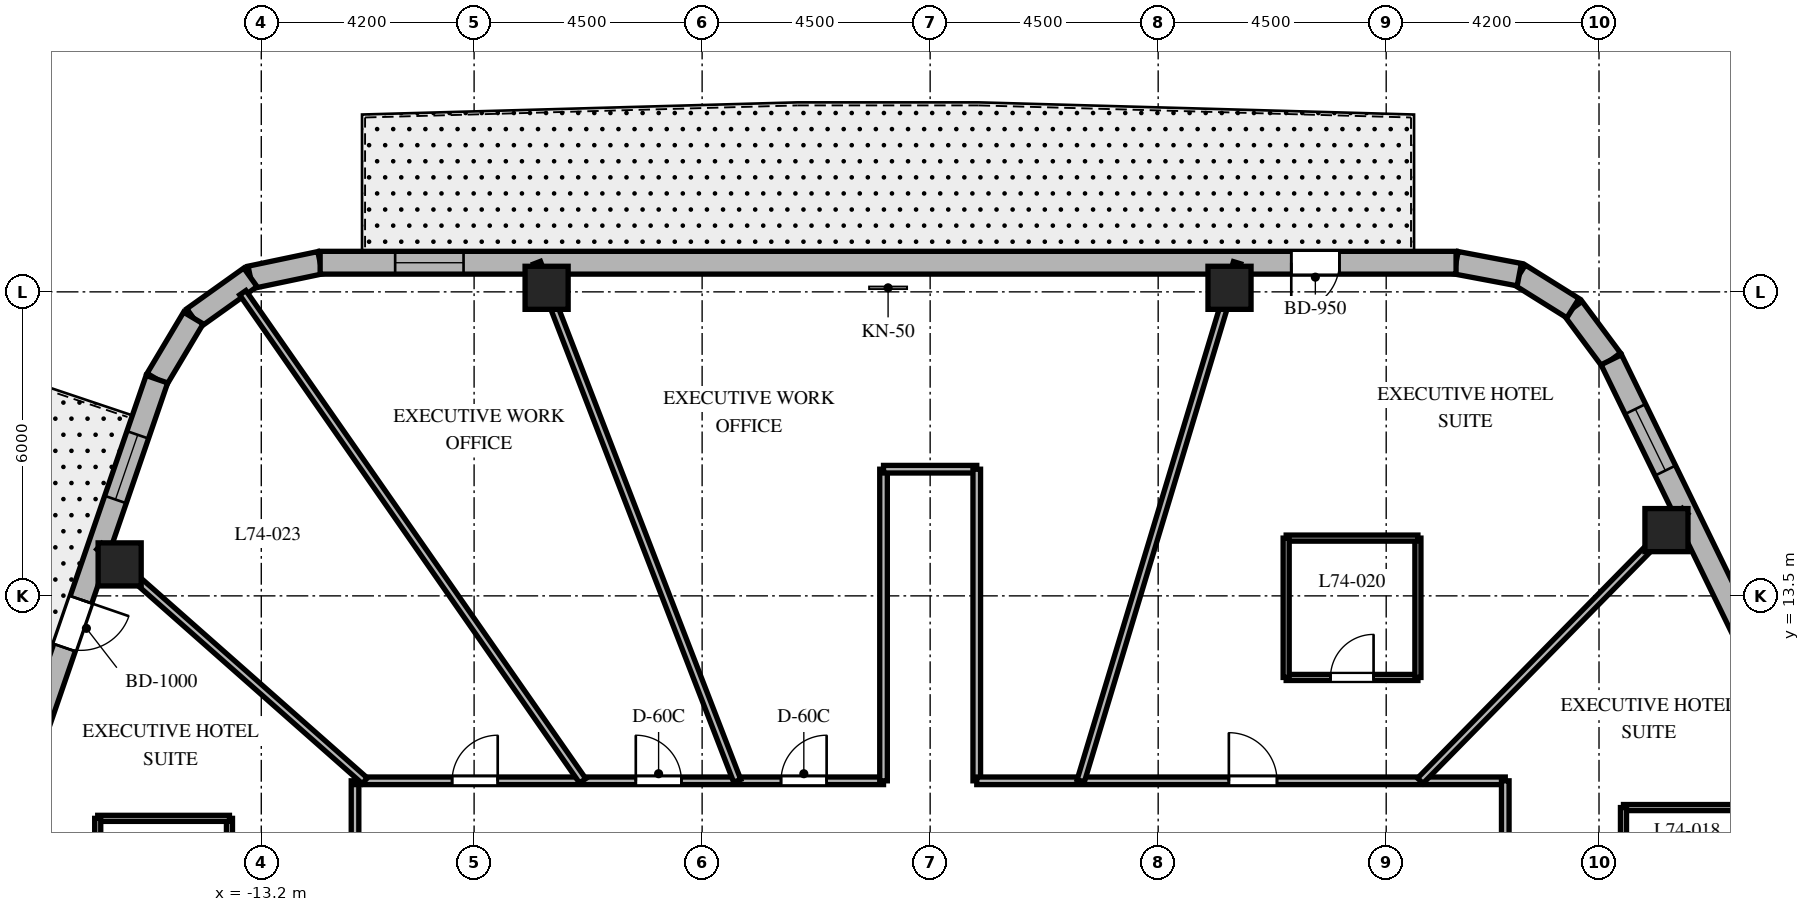
"""IFC4 building model, lengths in metres.
Left out: names, types, materials, properties, quantities, classifications, styles, units other than length and angle.
Written with IfcOpenShell. Run it as: python <this file> out.ifc"""

import sys

from ifc_helpers import new_model, si_unit, direction, frame, frame_2d, origin, origin_2d, place, context, subcontext, project, spatial, rectangle, extrude, element, fill, save


model = new_model("IFC4")
c1 = context("Model", 3, precision=1e-05, world=origin(), true_north=direction((0.0, 1.0)))
c2 = subcontext(c1, "Body", "Model", "MODEL_VIEW")
j1 = project(units=[si_unit("LENGTHUNIT", "METRE"), si_unit("PLANEANGLEUNIT", "RADIAN")], contexts=[c1])
p1 = place(None, origin())
s1 = spatial("IfcSite", under=j1, at=p1, CompositionType="ELEMENT")
p2 = place(p1, origin())
s2 = spatial("IfcBuilding", under=s1, at=p2, CompositionType="ELEMENT")
p3 = place(p2, frame((0.0, 0.0, 297.6)))
s3 = spatial("IfcBuildingStorey", under=s2, at=p3, CompositionType="ELEMENT", Elevation=297.6)
for number, where, z_axis, x_axis in (
    (1, (14.531, 14.798, 0.0), (0.0, 0.0, 1.0), (1.0, 0.0, 0.0)),
    (2, (5.908, 19.58, 0.0), (0.0, 0.0, 1.0), (1.0, 0.0, 0.0)),
    (3, (-7.569, 19.58, 0.0), (0.0, 0.0, 1.0), (1.0, 0.0, 0.0)),
    (4, (-15.995, 14.121, 0.0), (0.0, 0.0, 1.0), (1.0, 0.0, 0.0)),
):
    element("IfcColumn", number, at=place(p3, frame(where, z_axis=z_axis, x_axis=x_axis)), inside=s3, PredefinedType="COLUMN", context=c2, shape_type="SweptSolid", body=[
        extrude(rectangle(XDim=0.85, YDim=0.85, at=origin_2d()), origin(), (0.0, 0.0, 1.0), 3.9),
    ])
p4 = place(p3, frame((13.443, 18.16, 0.0), z_axis=(0.0, 0.0, 1.0), x_axis=(-0.597042425808, 0.802209661987, 0.0)))
e5 = element("IfcWall", 5, at=p4, inside=s3, PredefinedType="SOLIDWALL", context=c2, shape_type="SweptSolid", body=[
    extrude(rectangle(XDim=1.27, YDim=0.45, at=frame_2d((0.635, 0.0))), origin(), (0.0, 0.0, 1.0), 3.6),
])
p5 = place(p3, frame((12.685, 19.178, 0.0), z_axis=(0.0, 0.0, 1.0), x_axis=(-0.848031272749, 0.529946186362, 0.0)))
e6 = element("IfcWall", 6, at=p5, inside=s3, PredefinedType="SOLIDWALL", context=c2, shape_type="SweptSolid", body=[
    extrude(rectangle(XDim=1.248, YDim=0.45, at=frame_2d((0.624, 0.0))), origin(), (0.0, 0.0, 1.0), 3.6),
])
p6 = place(p3, frame((11.626, 19.84, 0.0), z_axis=(0.0, 0.0, 1.0), x_axis=(-0.982701956681, 0.185194126083, 0.0)))
e7 = element("IfcWall", 7, at=p6, inside=s3, PredefinedType="SOLIDWALL", context=c2, shape_type="SweptSolid", body=[
    extrude(rectangle(XDim=1.27, YDim=0.45, at=frame_2d((0.635, 0.0))), origin(), (0.0, 0.0, 1.0), 3.6),
])
p7 = place(p3, frame((-12.038, 20.075, 0.0), z_axis=(0.0, 0.0, 1.0), x_axis=(-0.978750122553, -0.205056571711, 0.0)))
e8 = element("IfcWall", 8, at=p7, inside=s3, PredefinedType="SOLIDWALL", context=c2, shape_type="SweptSolid", body=[
    extrude(rectangle(XDim=1.406, YDim=0.45, at=frame_2d((0.703, 0.0))), origin(), (0.0, 0.0, 1.0), 3.6),
])
p8 = place(p3, frame((-13.415, 19.787, 0.0), z_axis=(0.0, 0.0, 1.0), x_axis=(-0.814055493997, -0.580787097561, 0.0)))
e9 = element("IfcWall", 9, at=p8, inside=s3, PredefinedType="SOLIDWALL", context=c2, shape_type="SweptSolid", body=[
    extrude(rectangle(XDim=1.383, YDim=0.45, at=frame_2d((0.691, 0.0))), origin(), (0.0, 0.0, 1.0), 3.6),
])
p9 = place(p3, frame((-14.54, 18.984, 0.0), z_axis=(0.0, 0.0, 1.0), x_axis=(-0.512374906623, -0.858761873317, 0.0)))
e10 = element("IfcWall", 10, at=p9, inside=s3, PredefinedType="SOLIDWALL", context=c2, shape_type="SweptSolid", body=[
    extrude(rectangle(XDim=1.406, YDim=0.45, at=frame_2d((0.703, 0.0))), origin(), (0.0, 0.0, 1.0), 3.6),
])
p10 = place(p3, frame((21.138, 2.371, 0.0), z_axis=(0.0, 0.0, 1.0), x_axis=(-0.438128124058, 0.89891253574, 0.0)))
e11 = element("IfcWall", 11, at=p10, inside=s3, PredefinedType="SOLIDWALL", context=c2, shape_type="SweptSolid", body=[
    extrude(rectangle(XDim=17.565, YDim=0.45, at=frame_2d((8.782, 0.0))), origin(), (0.0, 0.0, 1.0), 3.6),
])
p11 = place(p10, frame((1.133, 0.0, 0.8)))
e12 = element("IfcOpeningElement", 12, at=p11, cuts=e11, PredefinedType="OPENING", context=c2, shape_type="SweptSolid", body=[
    extrude(rectangle(XDim=1.35, YDim=1.75, at=frame_2d((0.675, 0.875))), frame((0.0, 0.235, 0.0), z_axis=(0.0, -1.0, 0.0), x_axis=(1.0, 0.0, 0.0)), (0.0, 0.0, 1.0), 0.47),
])
p12 = place(p10, frame((8.158, 0.0, 0.8)))
e13 = element("IfcOpeningElement", 13, at=p12, cuts=e11, PredefinedType="OPENING", context=c2, shape_type="SweptSolid", body=[
    extrude(rectangle(XDim=1.35, YDim=1.75, at=frame_2d((0.675, 0.875))), frame((0.0, 0.235, 0.0), z_axis=(0.0, -1.0, 0.0), x_axis=(1.0, 0.0, 0.0)), (0.0, 0.0, 1.0), 0.47),
])
p13 = place(p10, frame((15.132, 0.0, 0.8)))
e14 = element("IfcOpeningElement", 14, at=p13, cuts=e11, PredefinedType="OPENING", context=c2, shape_type="SweptSolid", body=[
    extrude(rectangle(XDim=1.35, YDim=1.75, at=frame_2d((0.675, 0.875))), frame((0.0, 0.235, 0.0), z_axis=(0.0, -1.0, 0.0), x_axis=(1.0, 0.0, 0.0)), (0.0, 0.0, 1.0), 0.47),
])
p14 = place(p3, frame((10.379, 20.075, 0.0), z_axis=(0.0, 0.0, 1.0), x_axis=(-1.0, 0.0, 0.0)))
e15 = element("IfcWall", 15, at=p14, inside=s3, PredefinedType="SOLIDWALL", context=c2, shape_type="SweptSolid", body=[
    extrude(rectangle(XDim=22.417, YDim=0.45, at=frame_2d((11.208, 0.0))), origin(), (0.0, 0.0, 1.0), 3.6),
])
p15 = place(p14, frame((2.302, 0.0, 0.0)))
e16 = element("IfcOpeningElement", 16, at=p15, cuts=e15, PredefinedType="OPENING", context=c2, shape_type="SweptSolid", body=[
    extrude(rectangle(XDim=0.95, YDim=2.15, at=frame_2d((0.475, 1.075))), frame((0.0, 0.235, 0.0), z_axis=(0.0, -1.0, 0.0), x_axis=(1.0, 0.0, 0.0)), (0.0, 0.0, 1.0), 0.47),
])
p16 = place(p14, frame((19.587, 0.0, 0.8)))
e17 = element("IfcOpeningElement", 17, at=p16, cuts=e15, PredefinedType="OPENING", context=c2, shape_type="SweptSolid", body=[
    extrude(rectangle(XDim=1.35, YDim=1.75, at=frame_2d((0.675, 0.875))), frame((0.0, 0.235, 0.0), z_axis=(0.0, -1.0, 0.0), x_axis=(1.0, 0.0, 0.0)), (0.0, 0.0, 1.0), 0.47),
])
p17 = place(p3, frame((-15.26, 17.776, 0.0), z_axis=(0.0, 0.0, 1.0), x_axis=(-0.325407437101, -0.945573899745, 0.0)))
e18 = element("IfcWall", 18, at=p17, inside=s3, PredefinedType="SOLIDWALL", context=c2, shape_type="SweptSolid", body=[
    extrude(rectangle(XDim=18.552, YDim=0.45, at=frame_2d((9.276, 0.0))), origin(), (0.0, 0.0, 1.0), 3.6),
])
p18 = place(p17, frame((4.602, 0.0, 0.0)))
e19 = element("IfcOpeningElement", 19, at=p18, cuts=e18, PredefinedType="OPENING", context=c2, shape_type="SweptSolid", body=[
    extrude(rectangle(XDim=1.0, YDim=2.15, at=frame_2d((0.5, 1.075))), frame((0.0, 0.235, 0.0), z_axis=(0.0, -1.0, 0.0), x_axis=(1.0, 0.0, 0.0)), (0.0, 0.0, 1.0), 0.47),
])
p19 = place(p17, frame((1.161, 0.0, 0.8)))
e20 = element("IfcOpeningElement", 20, at=p19, cuts=e18, PredefinedType="OPENING", context=c2, shape_type="SweptSolid", body=[
    extrude(rectangle(XDim=1.35, YDim=1.75, at=frame_2d((0.675, 0.875))), frame((0.0, 0.235, 0.0), z_axis=(0.0, -1.0, 0.0), x_axis=(1.0, 0.0, 0.0)), (0.0, 0.0, 1.0), 0.47),
])
p20 = place(p17, frame((8.548, 0.0, 0.8)))
e21 = element("IfcOpeningElement", 21, at=p20, cuts=e18, PredefinedType="OPENING", context=c2, shape_type="SweptSolid", body=[
    extrude(rectangle(XDim=1.35, YDim=1.75, at=frame_2d((0.675, 0.875))), frame((0.0, 0.235, 0.0), z_axis=(0.0, -1.0, 0.0), x_axis=(1.0, 0.0, 0.0)), (0.0, 0.0, 1.0), 0.47),
])
p21 = place(p17, frame((15.987, 0.0, 0.8)))
e22 = element("IfcOpeningElement", 22, at=p21, cuts=e18, PredefinedType="OPENING", context=c2, shape_type="SweptSolid", body=[
    extrude(rectangle(XDim=1.35, YDim=1.75, at=frame_2d((0.675, 0.875))), frame((0.0, 0.235, 0.0), z_axis=(0.0, -1.0, 0.0), x_axis=(1.0, 0.0, 0.0)), (0.0, 0.0, 1.0), 0.47),
])
p22 = place(p3, frame((-11.35, 4.4, 0.0), z_axis=(0.0, 0.0, 1.0), x_axis=(0.0, 1.0, 0.0)))
e23 = element("IfcWall", 23, at=p22, inside=s3, PredefinedType="PARTITIONING", context=c2, shape_type="SweptSolid", body=[
    extrude(rectangle(XDim=5.45, YDim=0.15, at=frame_2d((2.725, 0.0))), origin(), (0.0, 0.0, 1.0), 2.816),
])
p23 = place(p3, frame((-11.35, 9.85, 0.0), z_axis=(0.0, 0.0, 1.0), x_axis=(1.0, 0.0, 0.0)))
e24 = element("IfcWall", 24, at=p23, inside=s3, PredefinedType="PARTITIONING", context=c2, shape_type="SweptSolid", body=[
    extrude(rectangle(XDim=10.43, YDim=0.15, at=frame_2d((5.215, 0.0))), origin(), (0.0, 0.0, 1.0), 2.894),
])
p24 = place(p23, frame((8.407, 0.0, 0.0)))
e25 = element("IfcOpeningElement", 25, at=p24, cuts=e24, PredefinedType="OPENING", context=c2, shape_type="SweptSolid", body=[
    extrude(rectangle(XDim=0.9, YDim=2.03, at=frame_2d((0.45, 1.015))), frame((0.0, 0.085, 0.0), z_axis=(0.0, -1.0, 0.0), x_axis=(1.0, 0.0, 0.0)), (0.0, 0.0, 1.0), 0.17),
])
p25 = place(p23, frame((5.541, 0.0, 0.0)))
e26 = element("IfcOpeningElement", 26, at=p25, cuts=e24, PredefinedType="OPENING", context=c2, shape_type="SweptSolid", body=[
    extrude(rectangle(XDim=0.9, YDim=2.03, at=frame_2d((0.45, 1.015))), frame((0.0, 0.085, 0.0), z_axis=(0.0, -1.0, 0.0), x_axis=(1.0, 0.0, 0.0)), (0.0, 0.0, 1.0), 0.17),
])
p26 = place(p23, frame((1.916, 0.0, 0.0)))
e27 = element("IfcOpeningElement", 27, at=p26, cuts=e24, PredefinedType="OPENING", context=c2, shape_type="SweptSolid", body=[
    extrude(rectangle(XDim=0.9, YDim=2.03, at=frame_2d((0.45, 1.015))), frame((0.0, 0.085, 0.0), z_axis=(0.0, -1.0, 0.0), x_axis=(1.0, 0.0, 0.0)), (0.0, 0.0, 1.0), 0.17),
])
p27 = place(p3, frame((-0.92, 9.85, 0.0), z_axis=(0.0, 0.0, 1.0), x_axis=(0.0, 1.0, 0.0)))
e28 = element("IfcWall", 28, at=p27, inside=s3, PredefinedType="PARTITIONING", context=c2, shape_type="SweptSolid", body=[
    extrude(rectangle(XDim=6.15, YDim=0.15, at=frame_2d((3.075, 0.0))), origin(), (0.0, 0.0, 1.0), 3.04),
])
p28 = place(p3, frame((-0.92, 16.0, 0.0), z_axis=(0.0, 0.0, 1.0), x_axis=(1.0, 0.0, 0.0)))
e29 = element("IfcWall", 29, at=p28, inside=s3, PredefinedType="PARTITIONING", context=c2, shape_type="SweptSolid", body=[
    extrude(rectangle(XDim=1.84, YDim=0.15, at=frame_2d((0.92, 0.0))), origin(), (0.0, 0.0, 1.0), 3.6),
])
p29 = place(p3, frame((0.92, 16.0, 0.0), z_axis=(0.0, 0.0, 1.0), x_axis=(0.0, -1.0, 0.0)))
e30 = element("IfcWall", 30, at=p29, inside=s3, PredefinedType="PARTITIONING", context=c2, shape_type="SweptSolid", body=[
    extrude(rectangle(XDim=6.15, YDim=0.15, at=frame_2d((3.075, 0.0))), origin(), (0.0, 0.0, 1.0), 3.04),
])
p30 = place(p3, frame((0.92, 9.85, 0.0), z_axis=(0.0, 0.0, 1.0), x_axis=(1.0, 0.0, 0.0)))
e31 = element("IfcWall", 31, at=p30, inside=s3, PredefinedType="PARTITIONING", context=c2, shape_type="SweptSolid", body=[
    extrude(rectangle(XDim=10.43, YDim=0.15, at=frame_2d((5.215, 0.0))), origin(), (0.0, 0.0, 1.0), 2.816),
])
p31 = place(p30, frame((4.975, 0.0, 0.0)))
e32 = element("IfcOpeningElement", 32, at=p31, cuts=e31, PredefinedType="OPENING", context=c2, shape_type="SweptSolid", body=[
    extrude(rectangle(XDim=0.95, YDim=2.03, at=frame_2d((0.475, 1.015))), frame((0.0, 0.085, 0.0), z_axis=(0.0, -1.0, 0.0), x_axis=(1.0, 0.0, 0.0)), (0.0, 0.0, 1.0), 0.17),
])
p32 = place(p3, frame((11.35, 9.85, 0.0), z_axis=(0.0, 0.0, 1.0), x_axis=(0.0, -1.0, 0.0)))
e33 = element("IfcWall", 33, at=p32, inside=s3, PredefinedType="PARTITIONING", context=c2, shape_type="SweptSolid", body=[
    extrude(rectangle(XDim=12.4, YDim=0.15, at=frame_2d((6.2, 0.0))), origin(), (0.0, 0.0, 1.0), 2.894),
])
p33 = place(p32, frame((7.697, 0.0, 0.0)))
e34 = element("IfcOpeningElement", 34, at=p33, cuts=e33, PredefinedType="OPENING", context=c2, shape_type="SweptSolid", body=[
    extrude(rectangle(XDim=0.95, YDim=2.03, at=frame_2d((0.475, 1.015))), frame((0.0, 0.085, 0.0), z_axis=(0.0, -1.0, 0.0), x_axis=(1.0, 0.0, 0.0)), (0.0, 0.0, 1.0), 0.17),
])
p34 = place(p32, frame((2.998, 0.0, 0.0)))
e35 = element("IfcOpeningElement", 35, at=p34, cuts=e33, PredefinedType="OPENING", context=c2, shape_type="SweptSolid", body=[
    extrude(rectangle(XDim=0.95, YDim=2.03, at=frame_2d((0.475, 1.015))), frame((0.0, 0.085, 0.0), z_axis=(0.0, -1.0, 0.0), x_axis=(1.0, 0.0, 0.0)), (0.0, 0.0, 1.0), 0.17),
])
p35 = place(p32, frame((10.333, 0.0, 0.0)))
e36 = element("IfcOpeningElement", 36, at=p35, cuts=e33, PredefinedType="OPENING", context=c2, shape_type="SweptSolid", body=[
    extrude(rectangle(XDim=0.9, YDim=2.03, at=frame_2d((0.45, 1.015))), frame((0.0, 0.085, 0.0), z_axis=(0.0, -1.0, 0.0), x_axis=(1.0, 0.0, 0.0)), (0.0, 0.0, 1.0), 0.17),
])
p36 = place(p3, frame((9.672, 9.85, 0.0), z_axis=(0.0, 0.0, 1.0), x_axis=(0.700629771301, 0.713524998558, 0.0)))
e37 = element("IfcWall", 37, at=p36, inside=s3, PredefinedType="PARTITIONING", context=c2, shape_type="SweptSolid", body=[
    extrude(rectangle(XDim=7.459, YDim=0.15, at=frame_2d((3.73, 0.0))), origin(), (0.0, 0.0, 1.0), 2.94),
])
p37 = place(p3, frame((2.972, 9.85, 0.0), z_axis=(0.0, 0.0, 1.0), x_axis=(0.288872169679, 0.957367677324, 0.0)))
e38 = element("IfcWall", 38, at=p37, inside=s3, PredefinedType="PARTITIONING", context=c2, shape_type="SweptSolid", body=[
    extrude(rectangle(XDim=10.68, YDim=0.15, at=frame_2d((5.34, 0.0))), origin(), (0.0, 0.0, 1.0), 2.19),
])
p38 = place(p3, frame((-3.808, 9.85, 0.0), z_axis=(0.0, 0.0, 1.0), x_axis=(-0.360587327934, 0.932725457427, 0.0)))
e39 = element("IfcWall", 39, at=p38, inside=s3, PredefinedType="PARTITIONING", context=c2, shape_type="SweptSolid", body=[
    extrude(rectangle(XDim=10.962, YDim=0.15, at=frame_2d((5.481, 0.0))), origin(), (0.0, 0.0, 1.0), 2.19),
])
p39 = place(p3, frame((-6.858, 9.85, 0.0), z_axis=(0.0, 0.0, 1.0), x_axis=(-0.571391702066, 0.820677477948, 0.0)))
e40 = element("IfcWall", 40, at=p39, inside=s3, PredefinedType="PARTITIONING", context=c2, shape_type="SweptSolid", body=[
    extrude(rectangle(XDim=11.738, YDim=0.15, at=frame_2d((5.869, 0.0))), origin(), (0.0, 0.0, 1.0), 2.894),
])
p40 = place(p3, frame((-11.157, 9.85, 0.0), z_axis=(0.0, 0.0, 1.0), x_axis=(-0.74966962095, 0.661812253909, 0.0)))
e41 = element("IfcWall", 41, at=p40, inside=s3, PredefinedType="PARTITIONING", context=c2, shape_type="SweptSolid", body=[
    extrude(rectangle(XDim=6.989, YDim=0.15, at=frame_2d((3.494, 0.0))), origin(), (0.0, 0.0, 1.0), 2.94),
])
p41 = place(p3, frame((16.203, 9.322, 0.0), z_axis=(0.0, 0.0, 1.0), x_axis=(-1.0, 0.0, 0.0)))
e42 = element("IfcWall", 42, at=p41, inside=s3, PredefinedType="PARTITIONING", context=c2, shape_type="SweptSolid", body=[
    extrude(rectangle(XDim=2.52, YDim=0.12, at=frame_2d((1.26, 0.0))), origin(), (0.0, 0.0, 1.0), 3.126),
])
p42 = place(p3, frame((13.683, 9.322, 0.0), z_axis=(0.0, 0.0, 1.0), x_axis=(0.0, -1.0, 0.0)))
e43 = element("IfcWall", 43, at=p42, inside=s3, PredefinedType="PARTITIONING", context=c2, shape_type="SweptSolid", body=[
    extrude(rectangle(XDim=2.68, YDim=0.12, at=frame_2d((1.34, 0.0))), origin(), (0.0, 0.0, 1.0), 3.172),
])
p43 = place(p3, frame((7.026, 11.89, 0.0), z_axis=(0.0, 0.0, 1.0), x_axis=(1.0, 0.0, 0.0)))
e44 = element("IfcWall", 44, at=p43, inside=s3, PredefinedType="PARTITIONING", context=c2, shape_type="SweptSolid", body=[
    extrude(rectangle(XDim=2.6, YDim=0.12, at=frame_2d((1.3, 0.0))), origin(), (0.0, 0.0, 1.0), 3.04),
])
p44 = place(p43, frame((0.875, 0.0, 0.0)))
e45 = element("IfcOpeningElement", 45, at=p44, cuts=e44, PredefinedType="OPENING", context=c2, shape_type="SweptSolid", body=[
    extrude(rectangle(XDim=0.85, YDim=2.03, at=frame_2d((0.425, 1.015))), frame((0.0, 0.07, 0.0), z_axis=(0.0, -1.0, 0.0), x_axis=(1.0, 0.0, 0.0)), (0.0, 0.0, 1.0), 0.14),
])
p45 = place(p3, frame((9.626, 11.89, 0.0), z_axis=(0.0, 0.0, 1.0), x_axis=(0.0, 1.0, 0.0)))
e46 = element("IfcWall", 46, at=p45, inside=s3, PredefinedType="PARTITIONING", context=c2, shape_type="SweptSolid", body=[
    extrude(rectangle(XDim=2.75, YDim=0.12, at=frame_2d((1.375, 0.0))), origin(), (0.0, 0.0, 1.0), 3.04),
])
p46 = place(p3, frame((9.626, 14.64, 0.0), z_axis=(0.0, 0.0, 1.0), x_axis=(-1.0, 0.0, 0.0)))
e47 = element("IfcWall", 47, at=p46, inside=s3, PredefinedType="PARTITIONING", context=c2, shape_type="SweptSolid", body=[
    extrude(rectangle(XDim=2.6, YDim=0.12, at=frame_2d((1.3, 0.0))), origin(), (0.0, 0.0, 1.0), 3.172),
])
for number, where, z_axis, x_axis in (
    (48, (7.026, 14.64, 0.0), (0.0, 0.0, 1.0), (0.0, -1.0, 0.0)),
    (49, (-13.828, 6.359, 0.0), (0.0, 0.0, 1.0), (0.0, 1.0, 0.0)),
):
    element("IfcWall", number, at=place(p3, frame(where, z_axis=z_axis, x_axis=x_axis)), inside=s3, PredefinedType="PARTITIONING", context=c2, shape_type="SweptSolid", body=[
        extrude(rectangle(XDim=2.75, YDim=0.12, at=frame_2d((1.375, 0.0))), origin(), (0.0, 0.0, 1.0), 3.04),
    ])
p47 = place(p3, frame((-13.828, 9.109, 0.0), z_axis=(0.0, 0.0, 1.0), x_axis=(-1.0, 0.0, 0.0)))
e50 = element("IfcWall", 50, at=p47, inside=s3, PredefinedType="PARTITIONING", context=c2, shape_type="SweptSolid", body=[
    extrude(rectangle(XDim=2.6, YDim=0.12, at=frame_2d((1.3, 0.0))), origin(), (0.0, 0.0, 1.0), 3.172),
])
p48 = place(p3, frame((-16.428, 9.109, 0.0), z_axis=(0.0, 0.0, 1.0), x_axis=(0.0, -1.0, 0.0)))
e51 = element("IfcWall", 51, at=p48, inside=s3, PredefinedType="PARTITIONING", context=c2, shape_type="SweptSolid", body=[
    extrude(rectangle(XDim=2.75, YDim=0.12, at=frame_2d((1.375, 0.0))), origin(), (0.0, 0.0, 1.0), 3.6),
])
p49 = place(p13, origin())
e52 = element("IfcWindow", 52, at=p49, inside=s3, PartitioningType="SINGLE_PANEL", PredefinedType="WINDOW", context=c2, shape_type="SweptSolid", body=[
    extrude(rectangle(XDim=1.35, YDim=1.75, at=frame_2d((0.675, 0.875))), frame((0.0, 0.03, 0.0), z_axis=(0.0, -1.0, 0.0), x_axis=(1.0, 0.0, 0.0)), (0.0, 0.0, 1.0), 0.06),
])
fill(e14, e52)
p50 = place(p15, origin())
e53 = element("IfcDoor", 53, at=p50, inside=s3, OperationType="SINGLE_SWING_RIGHT", PredefinedType="DOOR", context=c2, shape_type="SweptSolid", body=[
    extrude(rectangle(XDim=0.95, YDim=2.15, at=frame_2d((0.475, 1.075))), frame((0.0, 0.025, 0.0), z_axis=(0.0, -1.0, 0.0), x_axis=(1.0, 0.0, 0.0)), (0.0, 0.0, 1.0), 0.05),
])
fill(e16, e53)
p51 = place(p16, origin())
e54 = element("IfcWindow", 54, at=p51, inside=s3, PartitioningType="SINGLE_PANEL", PredefinedType="WINDOW", context=c2, shape_type="SweptSolid", body=[
    extrude(rectangle(XDim=1.35, YDim=1.75, at=frame_2d((0.675, 0.875))), frame((0.0, 0.03, 0.0), z_axis=(0.0, -1.0, 0.0), x_axis=(1.0, 0.0, 0.0)), (0.0, 0.0, 1.0), 0.06),
])
fill(e17, e54)
p52 = place(p18, origin())
e55 = element("IfcDoor", 55, at=p52, inside=s3, OperationType="SINGLE_SWING_LEFT", PredefinedType="DOOR", context=c2, shape_type="SweptSolid", body=[
    extrude(rectangle(XDim=1.0, YDim=2.15, at=frame_2d((0.5, 1.075))), frame((0.0, 0.025, 0.0), z_axis=(0.0, -1.0, 0.0), x_axis=(1.0, 0.0, 0.0)), (0.0, 0.0, 1.0), 0.05),
])
fill(e19, e55)
p53 = place(p19, origin())
e56 = element("IfcWindow", 56, at=p53, inside=s3, PartitioningType="SINGLE_PANEL", PredefinedType="WINDOW", context=c2, shape_type="SweptSolid", body=[
    extrude(rectangle(XDim=1.35, YDim=1.75, at=frame_2d((0.675, 0.875))), frame((0.0, 0.03, 0.0), z_axis=(0.0, -1.0, 0.0), x_axis=(1.0, 0.0, 0.0)), (0.0, 0.0, 1.0), 0.06),
])
fill(e20, e56)
p54 = place(p31, origin())
e57 = element("IfcDoor", 57, at=p54, inside=s3, OperationType="SINGLE_SWING_LEFT", PredefinedType="DOOR", context=c2, shape_type="SweptSolid", body=[
    extrude(rectangle(XDim=0.95, YDim=2.03, at=frame_2d((0.475, 1.015))), frame((0.0, 0.025, 0.0), z_axis=(0.0, -1.0, 0.0), x_axis=(1.0, 0.0, 0.0)), (0.0, 0.0, 1.0), 0.05),
])
fill(e32, e57)
p55 = place(p44, origin())
e58 = element("IfcDoor", 58, at=p55, inside=s3, OperationType="SINGLE_SWING_RIGHT", PredefinedType="DOOR", context=c2, shape_type="SweptSolid", body=[
    extrude(rectangle(XDim=0.85, YDim=2.03, at=frame_2d((0.425, 1.015))), frame((0.0, 0.025, 0.0), z_axis=(0.0, -1.0, 0.0), x_axis=(1.0, 0.0, 0.0)), (0.0, 0.0, 1.0), 0.05),
])
fill(e45, e58)
p56 = place(p24, origin())
e59 = element("IfcDoor", 59, at=p56, inside=s3, OperationType="SINGLE_SWING_RIGHT", PredefinedType="DOOR", context=c2, shape_type="SweptSolid", body=[
    extrude(rectangle(XDim=0.9, YDim=2.03, at=frame_2d((0.45, 1.015))), frame((0.0, 0.025, 0.0), z_axis=(0.0, -1.0, 0.0), x_axis=(1.0, 0.0, 0.0)), (0.0, 0.0, 1.0), 0.05),
])
fill(e25, e59)
p57 = place(p25, origin())
e60 = element("IfcDoor", 60, at=p57, inside=s3, OperationType="SINGLE_SWING_LEFT", PredefinedType="DOOR", context=c2, shape_type="SweptSolid", body=[
    extrude(rectangle(XDim=0.9, YDim=2.03, at=frame_2d((0.45, 1.015))), frame((0.0, 0.025, 0.0), z_axis=(0.0, -1.0, 0.0), x_axis=(1.0, 0.0, 0.0)), (0.0, 0.0, 1.0), 0.05),
])
fill(e26, e60)
p58 = place(p26, origin())
e61 = element("IfcDoor", 61, at=p58, inside=s3, OperationType="SINGLE_SWING_RIGHT", PredefinedType="DOOR", context=c2, shape_type="SweptSolid", body=[
    extrude(rectangle(XDim=0.9, YDim=2.03, at=frame_2d((0.45, 1.015))), frame((0.0, 0.025, 0.0), z_axis=(0.0, -1.0, 0.0), x_axis=(1.0, 0.0, 0.0)), (0.0, 0.0, 1.0), 0.05),
])
fill(e27, e61)
save(model, sys.argv[1])
